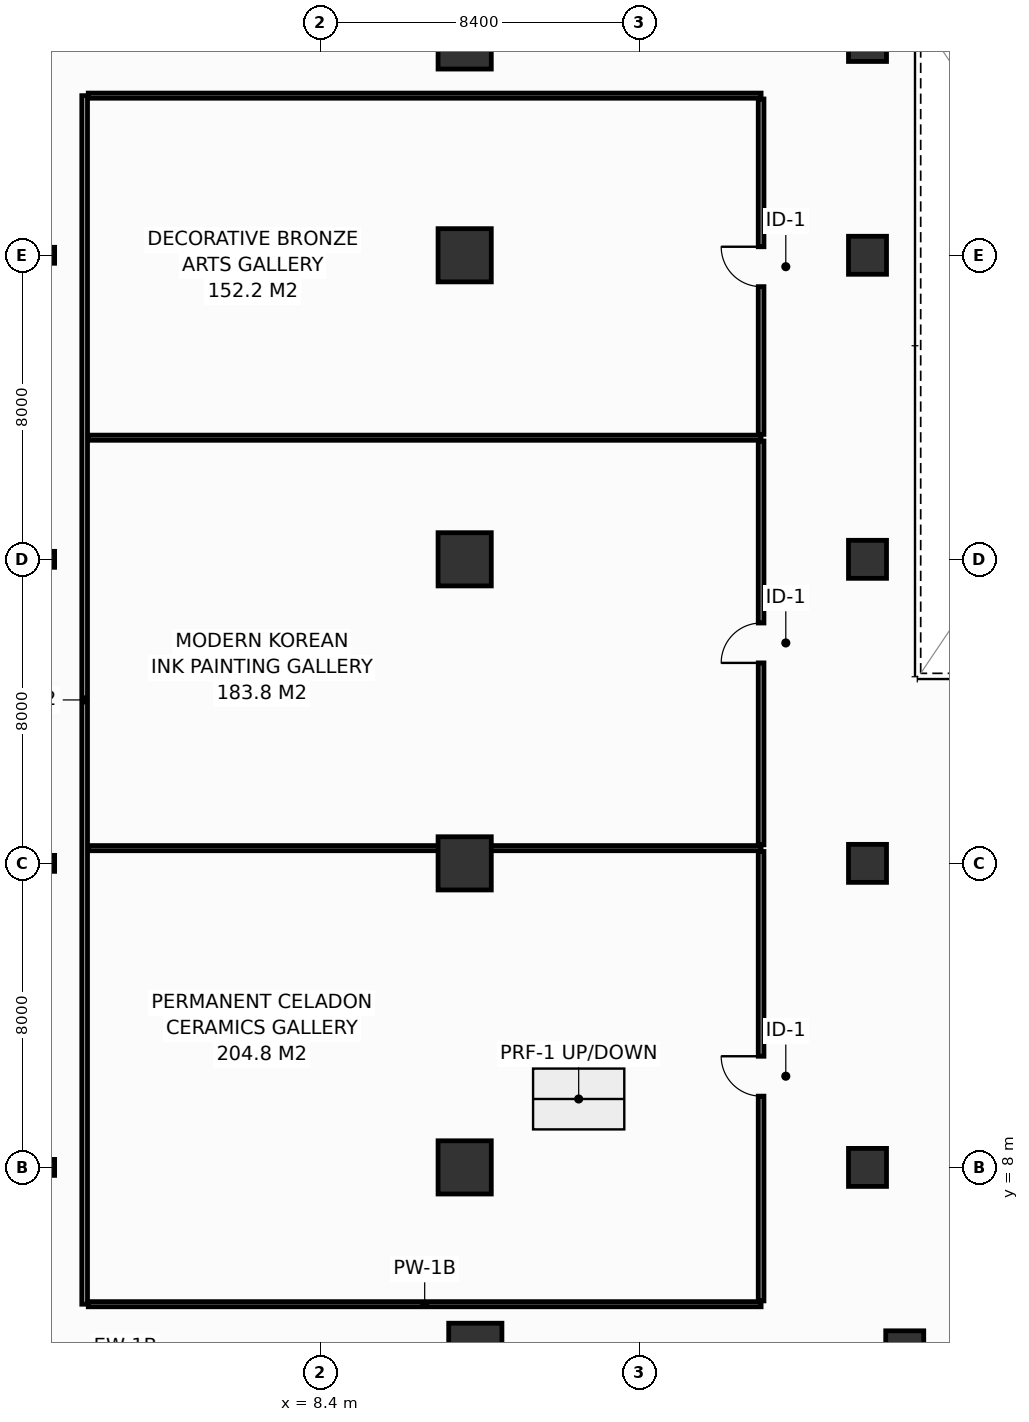
"""IFC4 building model, lengths in metres.
Left out: names, types, materials, properties, quantities, classifications, styles, units other than length and angle.
Written with IfcOpenShell. Run it as: python <this file> out.ifc"""

import sys

from ifc_helpers import new_model, si_unit, direction, frame, frame_2d, origin, origin_2d, place, context, subcontext, project, spatial, rectangle, hollow_rectangle, i_section, extrude, element, fill, save


model = new_model("IFC4")
c1 = context("Model", 3, precision=1e-05, world=origin(), true_north=direction((0.0, 1.0)))
c2 = subcontext(c1, "Body", "Model", "MODEL_VIEW")
j1 = project(units=[si_unit("LENGTHUNIT", "METRE"), si_unit("PLANEANGLEUNIT", "RADIAN")], contexts=[c1])
p1 = place(None, origin())
s1 = spatial("IfcSite", under=j1, at=p1, CompositionType="ELEMENT")
p2 = place(p1, origin())
s2 = spatial("IfcBuilding", under=s1, at=p2, CompositionType="ELEMENT")
p3 = place(p2, frame((0.0, 0.0, 22.2)))
s3 = spatial("IfcBuildingStorey", under=s2, at=p3, CompositionType="ELEMENT", Elevation=22.2)
p4 = place(p3, frame((12.48, 3.2, 0.0), z_axis=(0.0, 0.0, 1.0), x_axis=(1.0, 0.0, 0.0)))
e1 = element("IfcColumn", 1, at=p4, inside=s3, PredefinedType="COLUMN", context=c2, shape_type="SweptSolid", body=[
    extrude(hollow_rectangle(XDim=1.4, YDim=1.4, WallThickness=0.065, at=origin_2d()), origin(), (0.0, 0.0, 1.0), 5.4),
])
p5 = place(p3, frame((23.78, 3.2, 0.0), z_axis=(0.0, 0.0, 1.0), x_axis=(1.0, 0.0, 0.0)))
e2 = element("IfcColumn", 2, at=p5, inside=s3, PredefinedType="COLUMN", context=c2, shape_type="SweptSolid", body=[
    extrude(hollow_rectangle(XDim=1.0, YDim=1.0, WallThickness=0.045, at=origin_2d()), origin(), (0.0, 0.0, 1.0), 5.4),
])
p6 = place(p3, frame((12.2, 8.0, 0.0), z_axis=(0.0, 0.0, 1.0), x_axis=(1.0, 0.0, 0.0)))
e3 = element("IfcColumn", 3, at=p6, inside=s3, PredefinedType="COLUMN", context=c2, shape_type="SweptSolid", body=[
    extrude(hollow_rectangle(XDim=1.4, YDim=1.4, WallThickness=0.065, at=origin_2d()), origin(), (0.0, 0.0, 1.0), 5.4),
])
p7 = place(p3, frame((22.8, 8.0, 0.0), z_axis=(0.0, 0.0, 1.0), x_axis=(1.0, 0.0, 0.0)))
e4 = element("IfcColumn", 4, at=p7, inside=s3, PredefinedType="COLUMN", context=c2, shape_type="SweptSolid", body=[
    extrude(hollow_rectangle(XDim=1.0, YDim=1.0, WallThickness=0.045, at=origin_2d()), origin(), (0.0, 0.0, 1.0), 5.4),
])
p8 = place(p3, frame((12.2, 16.0, 0.0), z_axis=(0.0, 0.0, 1.0), x_axis=(1.0, 0.0, 0.0)))
e5 = element("IfcColumn", 5, at=p8, inside=s3, PredefinedType="COLUMN", context=c2, shape_type="SweptSolid", body=[
    extrude(hollow_rectangle(XDim=1.4, YDim=1.4, WallThickness=0.065, at=origin_2d()), origin(), (0.0, 0.0, 1.0), 5.4),
])
p9 = place(p3, frame((22.8, 16.0, 0.0), z_axis=(0.0, 0.0, 1.0), x_axis=(1.0, 0.0, 0.0)))
e6 = element("IfcColumn", 6, at=p9, inside=s3, PredefinedType="COLUMN", context=c2, shape_type="SweptSolid", body=[
    extrude(hollow_rectangle(XDim=1.0, YDim=1.0, WallThickness=0.045, at=origin_2d()), origin(), (0.0, 0.0, 1.0), 5.4),
])
p10 = place(p3, frame((12.2, 24.0, 0.0), z_axis=(0.0, 0.0, 1.0), x_axis=(1.0, 0.0, 0.0)))
e7 = element("IfcColumn", 7, at=p10, inside=s3, PredefinedType="COLUMN", context=c2, shape_type="SweptSolid", body=[
    extrude(hollow_rectangle(XDim=1.4, YDim=1.4, WallThickness=0.065, at=origin_2d()), origin(), (0.0, 0.0, 1.0), 5.4),
])
p11 = place(p3, frame((22.8, 24.0, 0.0), z_axis=(0.0, 0.0, 1.0), x_axis=(1.0, 0.0, 0.0)))
e8 = element("IfcColumn", 8, at=p11, inside=s3, PredefinedType="COLUMN", context=c2, shape_type="SweptSolid", body=[
    extrude(hollow_rectangle(XDim=1.0, YDim=1.0, WallThickness=0.045, at=origin_2d()), origin(), (0.0, 0.0, 1.0), 5.4),
])
p12 = place(p3, frame((12.2, 32.0, 0.0), z_axis=(0.0, 0.0, 1.0), x_axis=(1.0, 0.0, 0.0)))
e9 = element("IfcColumn", 9, at=p12, inside=s3, PredefinedType="COLUMN", context=c2, shape_type="SweptSolid", body=[
    extrude(hollow_rectangle(XDim=1.4, YDim=1.4, WallThickness=0.065, at=origin_2d()), origin(), (0.0, 0.0, 1.0), 5.4),
])
p13 = place(p3, frame((22.8, 32.0, 0.0), z_axis=(0.0, 0.0, 1.0), x_axis=(1.0, 0.0, 0.0)))
e10 = element("IfcColumn", 10, at=p13, inside=s3, PredefinedType="COLUMN", context=c2, shape_type="SweptSolid", body=[
    extrude(hollow_rectangle(XDim=1.0, YDim=1.0, WallThickness=0.045, at=origin_2d()), origin(), (0.0, 0.0, 1.0), 5.4),
])
p14 = place(p3, frame((12.2, 37.6, 0.0), z_axis=(0.0, 0.0, 1.0), x_axis=(1.0, 0.0, 0.0)))
e11 = element("IfcColumn", 11, at=p14, inside=s3, PredefinedType="COLUMN", context=c2, shape_type="SweptSolid", body=[
    extrude(hollow_rectangle(XDim=1.4, YDim=1.4, WallThickness=0.065, at=origin_2d()), origin(), (0.0, 0.0, 1.0), 5.4),
])
p15 = place(p3, frame((22.8, 37.6, 0.0), z_axis=(0.0, 0.0, 1.0), x_axis=(1.0, 0.0, 0.0)))
e12 = element("IfcColumn", 12, at=p15, inside=s3, PredefinedType="COLUMN", context=c2, shape_type="SweptSolid", body=[
    extrude(hollow_rectangle(XDim=1.0, YDim=1.0, WallThickness=0.045, at=origin_2d()), origin(), (0.0, 0.0, 1.0), 5.4),
])
for number, where, z_axis, x_axis in (
    (13, (1.2, 8.0, 0.0), (0.0, 0.0, 1.0), (1.0, 0.0, 0.0)),
    (14, (1.2, 16.0, 0.0), (0.0, 0.0, 1.0), (1.0, 0.0, 0.0)),
    (15, (1.2, 24.0, 0.0), (0.0, 0.0, 1.0), (1.0, 0.0, 0.0)),
    (16, (1.2, 32.0, 0.0), (0.0, 0.0, 1.0), (1.0, 0.0, 0.0)),
):
    element("IfcColumn", number, at=place(p3, frame(where, z_axis=z_axis, x_axis=x_axis)), inside=s3, PredefinedType="COLUMN", context=c2, shape_type="SweptSolid", body=[
        extrude(i_section(OverallWidth=0.42, OverallDepth=0.42, WebThickness=0.02, FlangeThickness=0.035, FilletRadius=0.022, at=origin_2d()), origin(), (0.0, 0.0, 1.0), 5.4),
    ])
p16 = place(p3, frame((2.2, 4.4, 0.0), z_axis=(0.0, 0.0, 1.0), x_axis=(0.0, 1.0, 0.0)))
e17 = element("IfcWall", 17, at=p16, inside=s3, PredefinedType="PARTITIONING", context=c2, shape_type="SweptSolid", body=[
    extrude(rectangle(XDim=31.8, YDim=0.15, at=frame_2d((15.9, 0.0))), origin(), (0.0, 0.0, 1.0), 4.235),
])
for number, where, z_axis, x_axis in (
    (18, (2.295, 4.4, 0.0), (0.0, 0.0, 1.0), (1.0, 0.0, 0.0)),
    (19, (2.295, 16.4, 0.0), (0.0, 0.0, 1.0), (1.0, 0.0, 0.0)),
    (20, (2.295, 27.2, 0.0), (0.0, 0.0, 1.0), (1.0, 0.0, 0.0)),
    (21, (2.295, 36.2, 0.0), (0.0, 0.0, 1.0), (1.0, 0.0, 0.0)),
):
    element("IfcWall", number, at=place(p3, frame(where, z_axis=z_axis, x_axis=x_axis)), inside=s3, PredefinedType="PARTITIONING", context=c2, shape_type="SweptSolid", body=[
        extrude(rectangle(XDim=17.705, YDim=0.135, at=frame_2d((8.853, 0.0))), origin(), (0.0, 0.0, 1.0), 4.235),
    ])
p17 = place(p3, frame((20.0, 4.488, 0.0), z_axis=(0.0, 0.0, 1.0), x_axis=(0.0, 1.0, 0.0)))
e22 = element("IfcWall", 22, at=p17, inside=s3, PredefinedType="PARTITIONING", context=c2, shape_type="SweptSolid", body=[
    extrude(rectangle(XDim=11.825, YDim=0.15, at=frame_2d((5.913, 0.0))), origin(), (0.0, 0.0, 1.0), 4.235),
])
p18 = place(p17, frame((5.387, 0.0, 0.0)))
e23 = element("IfcOpeningElement", 23, at=p18, cuts=e22, PredefinedType="OPENING", context=c2, shape_type="SweptSolid", body=[
    extrude(rectangle(XDim=1.05, YDim=2.15, at=frame_2d((0.525, 1.075))), frame((0.0, 0.085, 0.0), z_axis=(0.0, -1.0, 0.0), x_axis=(1.0, 0.0, 0.0)), (0.0, 0.0, 1.0), 0.17),
])
p19 = place(p3, frame((20.0, 16.488, 0.0), z_axis=(0.0, 0.0, 1.0), x_axis=(0.0, 1.0, 0.0)))
e24 = element("IfcWall", 24, at=p19, inside=s3, PredefinedType="PARTITIONING", context=c2, shape_type="SweptSolid", body=[
    extrude(rectangle(XDim=10.625, YDim=0.15, at=frame_2d((5.312, 0.0))), origin(), (0.0, 0.0, 1.0), 4.235),
])
p20 = place(p19, frame((4.787, 0.0, 0.0)))
e25 = element("IfcOpeningElement", 25, at=p20, cuts=e24, PredefinedType="OPENING", context=c2, shape_type="SweptSolid", body=[
    extrude(rectangle(XDim=1.05, YDim=2.15, at=frame_2d((0.525, 1.075))), frame((0.0, 0.085, 0.0), z_axis=(0.0, -1.0, 0.0), x_axis=(1.0, 0.0, 0.0)), (0.0, 0.0, 1.0), 0.17),
])
p21 = place(p3, frame((20.0, 27.288, 0.0), z_axis=(0.0, 0.0, 1.0), x_axis=(0.0, 1.0, 0.0)))
e26 = element("IfcWall", 26, at=p21, inside=s3, PredefinedType="PARTITIONING", context=c2, shape_type="SweptSolid", body=[
    extrude(rectangle(XDim=8.825, YDim=0.15, at=frame_2d((4.413, 0.0))), origin(), (0.0, 0.0, 1.0), 4.235),
])
p22 = place(p21, frame((3.887, 0.0, 0.0)))
e27 = element("IfcOpeningElement", 27, at=p22, cuts=e26, PredefinedType="OPENING", context=c2, shape_type="SweptSolid", body=[
    extrude(rectangle(XDim=1.05, YDim=2.15, at=frame_2d((0.525, 1.075))), frame((0.0, 0.085, 0.0), z_axis=(0.0, -1.0, 0.0), x_axis=(1.0, 0.0, 0.0)), (0.0, 0.0, 1.0), 0.17),
])
p23 = place(p18, origin())
e28 = element("IfcDoor", 28, at=p23, inside=s3, OperationType="SINGLE_SWING_RIGHT", PredefinedType="DOOR", context=c2, shape_type="SweptSolid", body=[
    extrude(rectangle(XDim=1.05, YDim=2.15, at=frame_2d((0.525, 1.075))), frame((0.0, 0.025, 0.0), z_axis=(0.0, -1.0, 0.0), x_axis=(1.0, 0.0, 0.0)), (0.0, 0.0, 1.0), 0.05),
])
fill(e23, e28)
p24 = place(p20, origin())
e29 = element("IfcDoor", 29, at=p24, inside=s3, OperationType="SINGLE_SWING_LEFT", PredefinedType="DOOR", context=c2, shape_type="SweptSolid", body=[
    extrude(rectangle(XDim=1.05, YDim=2.15, at=frame_2d((0.525, 1.075))), frame((0.0, 0.025, 0.0), z_axis=(0.0, -1.0, 0.0), x_axis=(1.0, 0.0, 0.0)), (0.0, 0.0, 1.0), 0.05),
])
fill(e25, e29)
p25 = place(p22, origin())
e30 = element("IfcDoor", 30, at=p25, inside=s3, OperationType="SINGLE_SWING_RIGHT", PredefinedType="DOOR", context=c2, shape_type="SweptSolid", body=[
    extrude(rectangle(XDim=1.05, YDim=2.15, at=frame_2d((0.525, 1.075))), frame((0.0, 0.025, 0.0), z_axis=(0.0, -1.0, 0.0), x_axis=(1.0, 0.0, 0.0)), (0.0, 0.0, 1.0), 0.05),
])
fill(e27, e30)
save(model, sys.argv[1])
